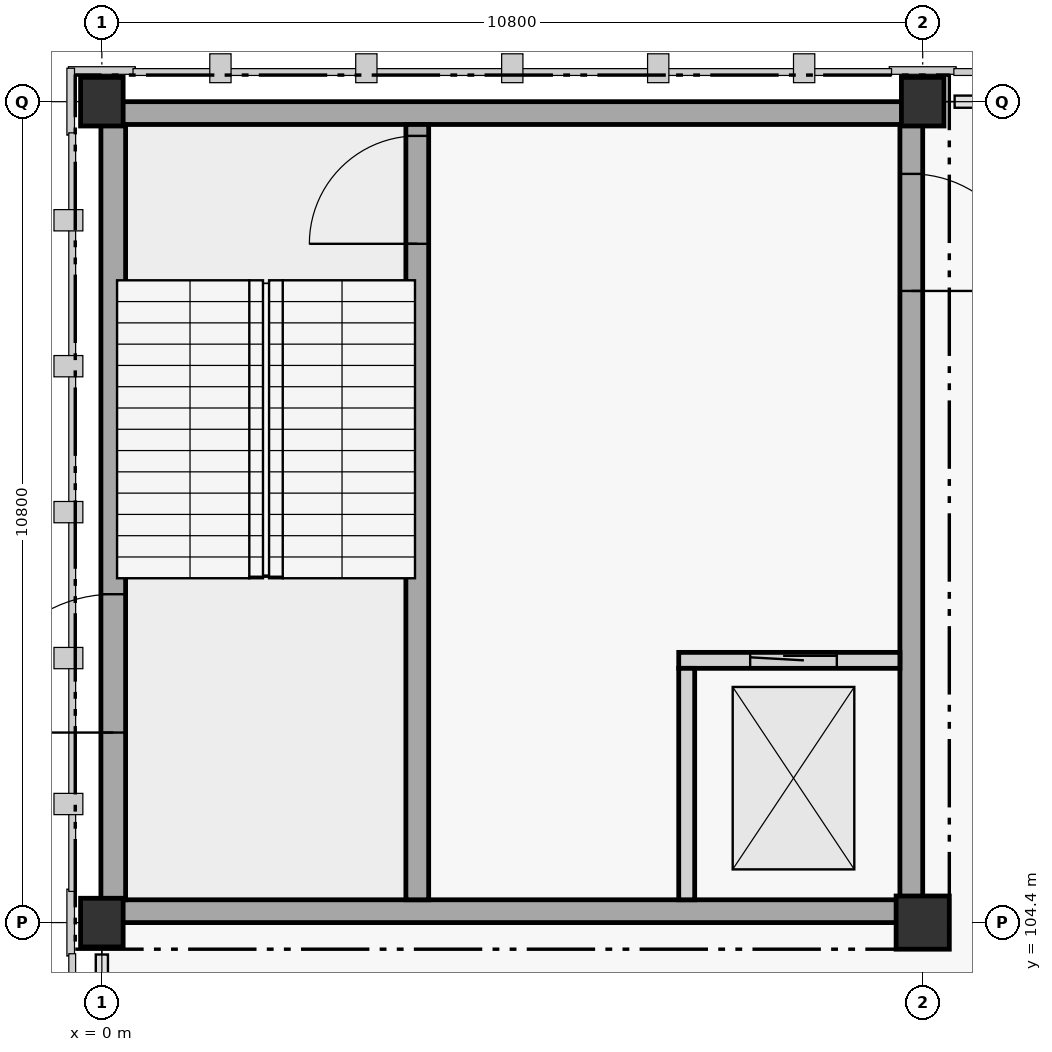
"""IFC4 building model, lengths in metres.
Left out: names, types, materials, properties, quantities, classifications, styles, units other than length and angle.
Written with IfcOpenShell. Run it as: python <this file> out.ifc"""

import sys

from ifc_helpers import new_model, si_unit, direction, frame, frame_2d, origin, origin_2d, place, context, subcontext, project, spatial, rectangle, extrude, element, fill, save


model = new_model("IFC4")
c1 = context("Model", 3, precision=1e-05, world=origin(), true_north=direction((0.0, 1.0)))
c2 = subcontext(c1, "Body", "Model", "MODEL_VIEW")
j1 = project(units=[si_unit("LENGTHUNIT", "METRE"), si_unit("PLANEANGLEUNIT", "RADIAN")], contexts=[c1])
p1 = place(None, origin())
s1 = spatial("IfcSite", under=j1, at=p1, CompositionType="ELEMENT")
p2 = place(p1, origin())
s2 = spatial("IfcBuilding", under=s1, at=p2, CompositionType="ELEMENT")
p3 = place(p2, origin())
s3 = spatial("IfcBuildingStorey", under=s2, at=p3, CompositionType="ELEMENT", Elevation=0.0)
for number, where, z_axis, x_axis in (
    (1, (0.0, 104.4, -0.3), (0.0, 0.0, 1.0), (1.0, 0.0, 0.0)),
    (2, (0.0, 115.2, -0.3), (0.0, 0.0, 1.0), (1.0, 0.0, 0.0)),
):
    element("IfcColumn", number, at=place(p3, frame(where, z_axis=z_axis, x_axis=x_axis)), inside=s3, PredefinedType="COLUMN", context=c2, shape_type="SweptSolid", body=[
        extrude(rectangle(XDim=0.56, YDim=0.64, at=origin_2d()), origin(), (0.0, 0.0, 1.0), 5.7),
    ])
p4 = place(p3, frame((10.8, 104.4, -0.3), z_axis=(0.0, 0.0, 1.0), x_axis=(1.0, 0.0, 0.0)))
e3 = element("IfcColumn", 3, at=p4, inside=s3, PredefinedType="COLUMN", context=c2, shape_type="SweptSolid", body=[
    extrude(rectangle(XDim=0.7, YDim=0.7, at=origin_2d()), origin(), (0.0, 0.0, 1.0), 5.7),
])
p5 = place(p3, frame((10.8, 115.2, -0.3), z_axis=(0.0, 0.0, 1.0), x_axis=(1.0, 0.0, 0.0)))
e4 = element("IfcColumn", 4, at=p5, inside=s3, PredefinedType="COLUMN", context=c2, shape_type="SweptSolid", body=[
    extrude(rectangle(XDim=0.56, YDim=0.64, at=origin_2d()), origin(), (0.0, 0.0, 1.0), 5.7),
])
for number, where, z_axis, x_axis in (
    (5, (10.8, 104.55, 0.0), (0.0, 0.0, 1.0), (-1.0, 0.0, 0.0)),
    (6, (0.0, 115.05, 0.0), (0.0, 0.0, 1.0), (1.0, 0.0, 0.0)),
):
    element("IfcWall", number, at=place(p3, frame(where, z_axis=z_axis, x_axis=x_axis)), inside=s3, PredefinedType="SHEAR", context=c2, shape_type="SweptSolid", body=[
        extrude(rectangle(XDim=10.8, YDim=0.3, at=frame_2d((5.4, 0.0))), origin(), (0.0, 0.0, 1.0), 5.4),
    ])
p6 = place(p3, frame((0.15, 104.7, 0.0), z_axis=(0.0, 0.0, 1.0), x_axis=(0.0, 1.0, 0.0)))
e7 = element("IfcWall", 7, at=p6, inside=s3, PredefinedType="SHEAR", context=c2, shape_type="SweptSolid", body=[
    extrude(rectangle(XDim=10.2, YDim=0.325, at=frame_2d((5.1, 0.0))), origin(), (0.0, 0.0, 1.0), 5.4),
])
p7 = place(p6, frame((2.2, 0.0, 0.0)))
e8 = element("IfcOpeningElement", 8, at=p7, cuts=e7, PredefinedType="OPENING", context=c2, shape_type="SweptSolid", body=[
    extrude(rectangle(XDim=1.82, YDim=2.22, at=frame_2d((0.91, 1.11))), frame((0.0, 0.163, 0.0), z_axis=(0.0, -1.0, 0.0), x_axis=(1.0, 0.0, 0.0)), (0.0, 0.0, 1.0), 0.325),
])
p8 = place(p3, frame((10.65, 114.9, 0.0), z_axis=(0.0, 0.0, 1.0), x_axis=(0.0, -1.0, 0.0)))
e9 = element("IfcWall", 9, at=p8, inside=s3, PredefinedType="SHEAR", context=c2, shape_type="SweptSolid", body=[
    extrude(rectangle(XDim=10.2, YDim=0.3, at=frame_2d((5.1, 0.0))), origin(), (0.0, 0.0, 1.0), 5.4),
])
p9 = place(p8, frame((0.65, 0.0, 0.0)))
e10 = element("IfcOpeningElement", 10, at=p9, cuts=e9, PredefinedType="OPENING", context=c2, shape_type="SweptSolid", body=[
    extrude(rectangle(XDim=1.54, YDim=2.22, at=frame_2d((0.77, 1.11))), frame((0.0, 0.15, 0.0), z_axis=(0.0, -1.0, 0.0), x_axis=(1.0, 0.0, 0.0)), (0.0, 0.0, 1.0), 0.3),
])
p10 = place(p3, frame((4.15, 104.7, 0.0), z_axis=(0.0, 0.0, 1.0), x_axis=(0.0, 1.0, 0.0)))
e11 = element("IfcWall", 11, at=p10, inside=s3, PredefinedType="SHEAR", context=c2, shape_type="SweptSolid", body=[
    extrude(rectangle(XDim=10.2, YDim=0.3, at=frame_2d((5.1, 0.0))), origin(), (0.0, 0.0, 1.0), 5.4),
])
p11 = place(p10, frame((8.63, 0.0, 0.0)))
e12 = element("IfcOpeningElement", 12, at=p11, cuts=e11, PredefinedType="OPENING", context=c2, shape_type="SweptSolid", body=[
    extrude(rectangle(XDim=1.42, YDim=2.2, at=frame_2d((0.71, 1.1))), frame((0.0, 0.15, 0.0), z_axis=(0.0, -1.0, 0.0), x_axis=(1.0, 0.0, 0.0)), (0.0, 0.0, 1.0), 0.3),
])
p12 = place(p3, frame((7.59, 107.85, 0.0), z_axis=(0.0, 0.0, 1.0), x_axis=(1.0, 0.0, 0.0)))
e13 = element("IfcWall", 13, at=p12, inside=s3, PredefinedType="STANDARD", context=c2, shape_type="SweptSolid", body=[
    extrude(rectangle(XDim=2.91, YDim=0.21, at=frame_2d((1.455, 0.0))), origin(), (0.0, 0.0, 1.0), 5.4),
])
p13 = place(p12, frame((0.94, 0.0, 0.0)))
e14 = element("IfcOpeningElement", 14, at=p13, cuts=e13, PredefinedType="OPENING", context=c2, shape_type="SweptSolid", body=[
    extrude(rectangle(XDim=1.14, YDim=2.16, at=frame_2d((0.57, 1.08))), frame((0.0, 0.105, 0.0), z_axis=(0.0, -1.0, 0.0), x_axis=(1.0, 0.0, 0.0)), (0.0, 0.0, 1.0), 0.21),
])
p14 = place(p3, frame((7.695, 104.7, 0.0), z_axis=(0.0, 0.0, 1.0), x_axis=(0.0, 1.0, 0.0)))
e15 = element("IfcWall", 15, at=p14, inside=s3, PredefinedType="STANDARD", context=c2, shape_type="SweptSolid", body=[
    extrude(rectangle(XDim=3.045, YDim=0.21, at=frame_2d((1.522, 0.0))), origin(), (0.0, 0.0, 1.0), 5.4),
])
p15 = place(p7, origin())
e16 = element("IfcDoor", 16, at=p15, inside=s3, OperationType="SINGLE_SWING_LEFT", PredefinedType="DOOR", context=c2, shape_type="SweptSolid", body=[
    extrude(rectangle(XDim=1.82, YDim=2.22, at=frame_2d((0.91, 1.11))), frame((0.0, 0.025, 0.0), z_axis=(0.0, -1.0, 0.0), x_axis=(1.0, 0.0, 0.0)), (0.0, 0.0, 1.0), 0.05),
])
fill(e8, e16)
p16 = place(p13, origin())
e17 = element("IfcDoor", 17, at=p16, inside=s3, OperationType="SLIDING_TO_LEFT", PredefinedType="DOOR", context=c2, shape_type="SweptSolid", body=[
    extrude(rectangle(XDim=1.14, YDim=2.16, at=frame_2d((0.57, 1.08))), frame((0.0, 0.025, 0.0), z_axis=(0.0, -1.0, 0.0), x_axis=(1.0, 0.0, 0.0)), (0.0, 0.0, 1.0), 0.05),
])
fill(e14, e17)
p17 = place(p11, origin())
e18 = element("IfcDoor", 18, at=p17, inside=s3, OperationType="SINGLE_SWING_LEFT", PredefinedType="DOOR", context=c2, shape_type="SweptSolid", body=[
    extrude(rectangle(XDim=1.42, YDim=2.2, at=frame_2d((0.71, 1.1))), frame((0.0, 0.025, 0.0), z_axis=(0.0, -1.0, 0.0), x_axis=(1.0, 0.0, 0.0)), (0.0, 0.0, 1.0), 0.05),
])
fill(e12, e18)
p18 = place(p9, origin())
e19 = element("IfcDoor", 19, at=p18, inside=s3, OperationType="SINGLE_SWING_RIGHT", PredefinedType="DOOR", context=c2, shape_type="SweptSolid", body=[
    extrude(rectangle(XDim=1.54, YDim=2.22, at=frame_2d((0.77, 1.11))), frame((0.0, 0.025, 0.0), z_axis=(0.0, -1.0, 0.0), x_axis=(1.0, 0.0, 0.0)), (0.0, 0.0, 1.0), 0.05),
])
fill(e10, e19)
save(model, sys.argv[1])
